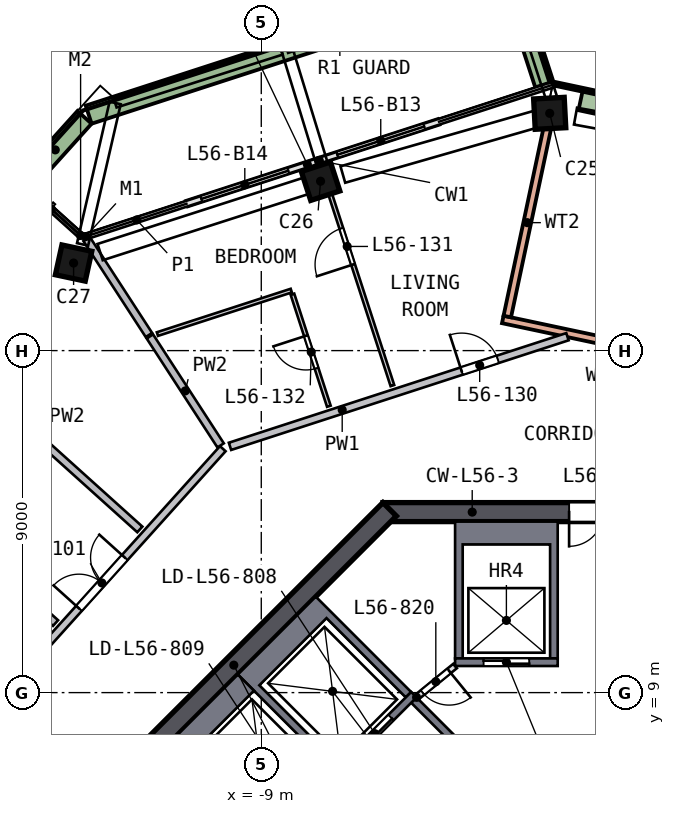
"""IFC4 building model, lengths in metres.
Left out: names, types, materials, properties, quantities, classifications, styles, units other than length and angle.
Written with IfcOpenShell. Run it as: python <this file> out.ifc"""

import sys

from ifc_helpers import new_model, si_unit, direction, frame, frame_2d, origin, origin_2d, place, context, subcontext, project, spatial, polyline, rectangle, outline, extrude, element, fill, save


model = new_model("IFC4")
c1 = context("Model", 3, precision=1e-05, world=origin(), true_north=direction((0.0, 1.0)))
c2 = subcontext(c1, "Body", "Model", "MODEL_VIEW")
j1 = project(units=[si_unit("LENGTHUNIT", "METRE"), si_unit("PLANEANGLEUNIT", "RADIAN")], contexts=[c1])
p1 = place(None, origin())
s1 = spatial("IfcSite", under=j1, at=p1, CompositionType="ELEMENT")
p2 = place(p1, origin())
s2 = spatial("IfcBuilding", under=s1, at=p2, CompositionType="ELEMENT")
p3 = place(p2, frame((0.0, 0.0, 230.5)))
s3 = spatial("IfcBuildingStorey", under=s2, at=p3, CompositionType="ELEMENT", Elevation=230.5)
p4 = place(p3, frame((-1.271, 24.253, 0.0), z_axis=(-0.115250266, -0.007070102, 0.993311326), x_axis=(0.991928647, 0.052401319, 0.115462816)))
e1 = element("IfcColumn", 1, at=p4, inside=s3, PredefinedType="COLUMN", context=c2, shape_type="SweptSolid", body=[
    extrude(rectangle(XDim=0.8, YDim=0.8, at=origin_2d()), origin(), (0.0, 0.0, 1.0), 3.211),
])
p5 = place(p3, frame((-7.311, 22.5, 0.0), z_axis=(-0.106771447, -0.03566653, 0.993643677), x_axis=(-0.945089515, -0.306813406, -0.112567057)))
e2 = element("IfcColumn", 2, at=p5, inside=s3, PredefinedType="COLUMN", context=c2, shape_type="SweptSolid", body=[
    extrude(rectangle(XDim=0.8, YDim=0.8, at=origin_2d()), origin(), (0.0, 0.0, 1.0), 3.21),
])
p6 = place(p3, frame((-13.822, 20.385, 0.0), z_axis=(-0.096378129, -0.06650699, 0.993120374), x_axis=(0.973507887, -0.214151828, 0.080133564)))
e3 = element("IfcColumn", 3, at=p6, inside=s3, PredefinedType="COLUMN", context=c2, shape_type="SweptSolid", body=[
    extrude(rectangle(XDim=0.8, YDim=0.8, at=origin_2d()), origin(), (0.0, 0.0, 1.0), 3.212),
])
p7 = place(p3, frame((5.799, 13.75, 0.0), z_axis=(0.0, 0.0, 1.0), x_axis=(-1.0, 0.0, 0.0)))
e4 = element("IfcWall", 4, at=p7, inside=s3, PredefinedType="SHEAR", context=c2, shape_type="SweptSolid", body=[
    extrude(rectangle(XDim=11.598, YDim=0.5, at=frame_2d((5.799, 0.0))), origin(), (0.0, 0.0, 1.0), 3.5),
])
p8 = place(p7, frame((4.899, 0.0, 0.0)))
e5 = element("IfcOpeningElement", 5, at=p8, cuts=e4, PredefinedType="OPENING", context=c2, shape_type="SweptSolid", body=[
    extrude(rectangle(XDim=1.8, YDim=2.1, at=frame_2d((0.9, 1.05))), frame((0.0, 0.26, 0.0), z_axis=(0.0, -1.0, 0.0), x_axis=(1.0, 0.0, 0.0)), (0.0, 0.0, 1.0), 0.52),
])
p9 = place(p3, frame((-5.622, 13.823, 0.0), z_axis=(0.0, 0.0, 1.0), x_axis=(-0.707106781, -0.707106781, 0.0)))
e6 = element("IfcWall", 6, at=p9, inside=s3, PredefinedType="SHEAR", context=c2, shape_type="SweptSolid", body=[
    extrude(rectangle(XDim=11.598, YDim=0.5, at=frame_2d((5.799, 0.0))), origin(), (0.0, 0.0, 1.0), 3.5),
])
p10 = place(p3, frame((-4.334, 24.02, 0.0), z_axis=(0.0, 0.0, 1.0), x_axis=(-0.95106016, -0.309005779, 0.0)))
e7 = element("IfcWall", 7, at=p10, inside=s3, PredefinedType="SOLIDWALL", context=c2, shape_type="SweptSolid", body=[
    extrude(rectangle(XDim=3.3, YDim=0.15, at=frame_2d((1.65, 0.0))), origin(), (0.0, 0.0, 1.0), 2.525),
])
p11 = place(p10, frame((0.4, 0.0, 0.0)))
e8 = element("IfcOpeningElement", 8, at=p11, cuts=e7, PredefinedType="OPENING", context=c2, shape_type="SweptSolid", body=[
    extrude(rectangle(XDim=2.4, YDim=2.4, at=frame_2d((1.2, 1.2))), frame((0.0, 0.085, 0.0), z_axis=(0.0, -1.0, 0.0), x_axis=(1.0, 0.0, 0.0)), (0.0, 0.0, 1.0), 0.17),
])
p12 = place(p3, frame((-7.473, 23.0, 0.0), z_axis=(0.0, 0.0, 1.0), x_axis=(-0.951056609, -0.30901671, 0.0)))
e9 = element("IfcWall", 9, at=p12, inside=s3, PredefinedType="SOLIDWALL", context=c2, shape_type="SweptSolid", body=[
    extrude(rectangle(XDim=3.661, YDim=0.15, at=frame_2d((1.831, 0.0))), origin(), (0.0, 0.0, 1.0), 2.525),
])
p13 = place(p12, frame((0.861, 0.0, 0.0)))
e10 = element("IfcOpeningElement", 10, at=p13, cuts=e9, PredefinedType="OPENING", context=c2, shape_type="SweptSolid", body=[
    extrude(rectangle(XDim=2.4, YDim=2.4, at=frame_2d((1.2, 1.2))), frame((0.0, 0.085, 0.0), z_axis=(0.0, -1.0, 0.0), x_axis=(1.0, 0.0, 0.0)), (0.0, 0.0, 1.0), 0.17),
])
p14 = place(p3, frame((-1.552, 25.003, 0.0), z_axis=(0.0, 0.0, 1.0), x_axis=(-0.309006691, 0.951059864, 0.0)))
e11 = element("IfcWall", 11, at=p14, inside=s3, PredefinedType="SOLIDWALL", context=c2, shape_type="SweptSolid", body=[
    extrude(rectangle(XDim=3.199, YDim=0.5, at=frame_2d((1.6, 0.0))), origin(), (0.0, 0.0, 1.0), 0.7),
])
p15 = place(p3, frame((-2.701, 27.731, 0.0), z_axis=(0.0, 0.0, 1.0), x_axis=(-0.951061138, -0.309002771, 0.0)))
e12 = element("IfcWall", 12, at=p15, inside=s3, PredefinedType="SOLIDWALL", context=c2, shape_type="SweptSolid", body=[
    extrude(rectangle(XDim=11.399, YDim=0.5, at=frame_2d((5.699, 0.0))), origin(), (0.0, 0.0, 1.0), 0.7),
])
p16 = place(p3, frame((-13.651, 24.138, 0.0), z_axis=(0.0, 0.0, 1.0), x_axis=(-0.669140422, -0.743135988, 0.0)))
e13 = element("IfcWall", 13, at=p16, inside=s3, PredefinedType="SOLIDWALL", context=c2, shape_type="SweptSolid", body=[
    extrude(rectangle(XDim=2.303, YDim=0.5, at=frame_2d((1.151, 0.0))), origin(), (0.0, 0.0, 1.0), 0.7),
])
p17 = place(p3, frame((-2.645, 18.82, 0.0), z_axis=(0.0, 0.0, 1.0), x_axis=(0.978146821, -0.207915357, 0.0)))
e14 = element("IfcWall", 14, at=p17, inside=s3, PredefinedType="SOLIDWALL", context=c2, shape_type="SweptSolid", body=[
    extrude(rectangle(XDim=13.0, YDim=0.2, at=frame_2d((6.5, 0.0))), origin(), (0.0, 0.0, 1.0), 3.19),
])
p18 = place(p17, frame((5.6, 0.0, 0.0)))
e15 = element("IfcOpeningElement", 15, at=p18, cuts=e14, PredefinedType="OPENING", context=c2, shape_type="SweptSolid", body=[
    extrude(rectangle(XDim=1.8, YDim=2.4, at=frame_2d((0.9, 1.2))), frame((0.0, 0.11, 0.0), z_axis=(0.0, -1.0, 0.0), x_axis=(1.0, 0.0, 0.0)), (0.0, 0.0, 1.0), 0.22),
])
p19 = place(p3, frame((-1.476, 23.838, 0.0), z_axis=(0.0, 0.0, 1.0), x_axis=(-0.207895168, -0.978151113, 0.0)))
e16 = element("IfcWall", 16, at=p19, inside=s3, PredefinedType="SOLIDWALL", context=c2, shape_type="SweptSolid", body=[
    extrude(rectangle(XDim=5.052, YDim=0.2, at=frame_2d((2.526, 0.0))), origin(), (0.0, 0.0, 1.0), 3.19),
])
p20 = place(p3, frame((11.313, 22.344, 0.0), z_axis=(0.0, 0.0, 1.0), x_axis=(-0.978146672, 0.207916061, 0.0)))
e17 = element("IfcWall", 17, at=p20, inside=s3, PredefinedType="SOLIDWALL", context=c2, shape_type="SweptSolid", body=[
    extrude(rectangle(XDim=12.84, YDim=0.1, at=frame_2d((6.42, 0.0))), origin(), (0.0, 0.0, 1.0), 0.7),
])
p21 = place(p3, frame((4.128, 23.565, 0.0), z_axis=(0.0, 0.0, 1.0), x_axis=(-0.978147683, 0.207911302, 0.0)))
e18 = element("IfcWall", 18, at=p21, inside=s3, PredefinedType="SOLIDWALL", context=c2, shape_type="SweptSolid", body=[
    extrude(rectangle(XDim=4.834, YDim=0.5, at=frame_2d((2.417, 0.0))), origin(), (0.0, 0.0, 1.0), 0.7),
])
p22 = place(p3, origin())
e19 = element("IfcWall", 19, at=p22, inside=s3, PredefinedType="SOLIDWALL", context=c2, shape_type="SweptSolid", body=[
    extrude(outline(polyline([(-3.9, 13.5), (-1.2, 13.5), (-1.2, 9.9), (-1.4, 9.9), (-1.4, 12.9), (-3.7, 12.9), (-3.7, 9.9), (-3.9, 9.9), (-3.9, 13.5)])), origin(), (0.0, 0.0, 1.0), 3.19),
])
p23 = place(p3, frame((-1.2, 9.8, 0.0), z_axis=(0.0, 0.0, 1.0), x_axis=(-1.0, 0.0, 0.0)))
e20 = element("IfcWall", 20, at=p23, inside=s3, PredefinedType="SOLIDWALL", context=c2, shape_type="SweptSolid", body=[
    extrude(rectangle(XDim=2.7, YDim=0.2, at=frame_2d((1.35, 0.0))), origin(), (0.0, 0.0, 1.0), 3.19),
])
p24 = place(p23, frame((0.75, 0.0, 0.0)))
e21 = element("IfcOpeningElement", 21, at=p24, cuts=e20, PredefinedType="OPENING", context=c2, shape_type="SweptSolid", body=[
    extrude(rectangle(XDim=1.2, YDim=2.1, at=frame_2d((0.6, 1.05))), frame((0.0, 0.11, 0.0), z_axis=(0.0, -1.0, 0.0), x_axis=(1.0, 0.0, 0.0)), (0.0, 0.0, 1.0), 0.22),
])
p25 = place(p3, origin())
e22 = element("IfcWall", 22, at=p25, inside=s3, PredefinedType="SOLIDWALL", context=c2, shape_type="SweptSolid", body=[
    extrude(outline(polyline([(-9.617, 9.475), (-7.566, 11.526), (-5.056, 9.016), (-5.197, 8.874), (-7.283, 10.96), (-9.051, 9.192), (-6.965, 7.106), (-7.106, 6.965), (-9.617, 9.475)])), origin(), (0.0, 0.0, 1.0), 3.19),
])
p26 = place(p3, frame((-4.985, 8.945, 0.0), z_axis=(0.0, 0.0, 1.0), x_axis=(-0.707106781, -0.707106781, 0.0)))
e23 = element("IfcWall", 23, at=p26, inside=s3, PredefinedType="SOLIDWALL", context=c2, shape_type="SweptSolid", body=[
    extrude(rectangle(XDim=2.9, YDim=0.2, at=frame_2d((1.45, 0.0))), origin(), (0.0, 0.0, 1.0), 3.19),
])
p27 = place(p26, frame((0.85, 0.0, 0.0)))
e24 = element("IfcOpeningElement", 24, at=p27, cuts=e23, PredefinedType="OPENING", context=c2, shape_type="SweptSolid", body=[
    extrude(rectangle(XDim=1.2, YDim=2.1, at=frame_2d((0.6, 1.05))), frame((0.0, 0.11, 0.0), z_axis=(0.0, -1.0, 0.0), x_axis=(1.0, 0.0, 0.0)), (0.0, 0.0, 1.0), 0.22),
])
p28 = place(p3, origin())
e25 = element("IfcWall", 25, at=p28, inside=s3, PredefinedType="SOLIDWALL", context=c2, shape_type="SweptSolid", body=[
    extrude(outline(polyline([(-11.526, 7.566), (-9.617, 9.475), (-9.192, 9.051), (-10.96, 7.283), (-8.874, 5.197), (-9.016, 5.056), (-11.526, 7.566)])), origin(), (0.0, 0.0, 1.0), 3.19),
])
p29 = place(p3, frame((-3.005, 6.823, 0.0), z_axis=(0.0, 0.0, 1.0), x_axis=(-0.707106781, 0.707106781, 0.0)))
e26 = element("IfcWall", 26, at=p29, inside=s3, PredefinedType="SOLIDWALL", context=c2, shape_type="SweptSolid", body=[
    extrude(rectangle(XDim=2.8, YDim=0.2, at=frame_2d((1.4, 0.0))), origin(), (0.0, 0.0, 1.0), 3.19),
])
p30 = place(p3, frame((-3.9, 9.7, 0.0), z_axis=(0.0, 0.0, 1.0), x_axis=(-0.775559878, -0.631274009, 0.0)))
e27 = element("IfcWall", 27, at=p30, inside=s3, PredefinedType="PARTITIONING", context=c2, shape_type="SweptSolid", body=[
    extrude(rectangle(XDim=1.308, YDim=0.15, at=frame_2d((0.654, 0.0))), origin(), (0.0, 0.0, 1.0), 3.19),
])
p31 = place(p30, frame((0.204, 0.0, 0.0)))
e28 = element("IfcOpeningElement", 28, at=p31, cuts=e27, PredefinedType="OPENING", context=c2, shape_type="SweptSolid", body=[
    extrude(rectangle(XDim=0.9, YDim=2.1, at=frame_2d((0.45, 1.05))), frame((0.0, 0.085, 0.0), z_axis=(0.0, -1.0, 0.0), x_axis=(1.0, 0.0, 0.0)), (0.0, 0.0, 1.0), 0.17),
])
p32 = place(p3, frame((-16.381, 8.346, 0.0), z_axis=(0.0, 0.0, 1.0), x_axis=(0.669131961, 0.743143605, 0.0)))
e29 = element("IfcWall", 29, at=p32, inside=s3, PredefinedType="SOLIDWALL", context=c2, shape_type="SweptSolid", body=[
    extrude(rectangle(XDim=9.517, YDim=0.2, at=frame_2d((4.758, 0.0))), origin(), (0.0, 0.0, 1.0), 3.19),
])
p33 = place(p32, frame((3.863, 0.0, 0.0)))
e30 = element("IfcOpeningElement", 30, at=p33, cuts=e29, PredefinedType="OPENING", context=c2, shape_type="SweptSolid", body=[
    extrude(rectangle(XDim=1.8, YDim=2.1, at=frame_2d((0.9, 1.05))), frame((0.0, 0.11, 0.0), z_axis=(0.0, -1.0, 0.0), x_axis=(1.0, 0.0, 0.0)), (0.0, 0.0, 1.0), 0.22),
])
p34 = place(p3, frame((-9.823, 15.481, 0.0), z_axis=(0.0, 0.0, 1.0), x_axis=(0.951064041, 0.308993835, 0.0)))
e31 = element("IfcWall", 31, at=p34, inside=s3, PredefinedType="SOLIDWALL", context=c2, shape_type="SweptSolid", body=[
    extrude(rectangle(XDim=9.337, YDim=0.2, at=frame_2d((4.668, 0.0))), origin(), (0.0, 0.0, 1.0), 3.19),
])
p35 = place(p34, frame((6.408, 0.0, 0.0)))
e32 = element("IfcOpeningElement", 32, at=p35, cuts=e31, PredefinedType="OPENING", context=c2, shape_type="SweptSolid", body=[
    extrude(rectangle(XDim=1.0, YDim=2.1, at=frame_2d((0.5, 1.05))), frame((0.0, 0.11, 0.0), z_axis=(0.0, -1.0, 0.0), x_axis=(1.0, 0.0, 0.0)), (0.0, 0.0, 1.0), 0.22),
])
p36 = place(p3, frame((-14.414, 10.831, 0.0), z_axis=(0.0, 0.0, 1.0), x_axis=(-0.743141846, 0.669133915, 0.0)))
e33 = element("IfcWall", 33, at=p36, inside=s3, PredefinedType="SOLIDWALL", context=c2, shape_type="SweptSolid", body=[
    extrude(rectangle(XDim=12.038, YDim=0.2, at=frame_2d((6.019, 0.0))), origin(), (0.0, 0.0, 1.0), 3.19),
])
p37 = place(p36, frame((3.65, 0.0, 0.0)))
e34 = element("IfcOpeningElement", 34, at=p37, cuts=e33, PredefinedType="OPENING", context=c2, shape_type="SweptSolid", body=[
    extrude(rectangle(XDim=1.0, YDim=2.1, at=frame_2d((0.5, 1.05))), frame((0.0, 0.11, 0.0), z_axis=(0.0, -1.0, 0.0), x_axis=(1.0, 0.0, 0.0)), (0.0, 0.0, 1.0), 0.22),
])
p38 = place(p3, frame((-21.141, 21.349, 0.0), z_axis=(0.0, 0.0, 1.0), x_axis=(0.743141846, -0.669133915, 0.0)))
e35 = element("IfcWall", 35, at=p38, inside=s3, PredefinedType="SOLIDWALL", context=c2, shape_type="SweptSolid", body=[
    extrude(rectangle(XDim=12.038, YDim=0.2, at=frame_2d((6.019, 0.0))), origin(), (0.0, 0.0, 1.0), 3.19),
])
p39 = place(p38, frame((3.95, 0.0, 0.0)))
e36 = element("IfcOpeningElement", 36, at=p39, cuts=e35, PredefinedType="OPENING", context=c2, shape_type="SweptSolid", body=[
    extrude(rectangle(XDim=1.0, YDim=2.1, at=frame_2d((0.5, 1.05))), frame((0.0, 0.11, 0.0), z_axis=(0.0, -1.0, 0.0), x_axis=(1.0, 0.0, 0.0)), (0.0, 0.0, 1.0), 0.22),
])
p40 = place(p3, frame((-13.596, 20.937, 0.0), z_axis=(0.0, 0.0, 1.0), x_axis=(0.544632104, -0.838675069, 0.0)))
e37 = element("IfcWall", 37, at=p40, inside=s3, PredefinedType="SOLIDWALL", context=c2, shape_type="SweptSolid", body=[
    extrude(rectangle(XDim=3.011, YDim=0.2, at=frame_2d((1.506, 0.0))), origin(), (0.0, 0.0, 1.0), 3.19),
])
p41 = place(p3, frame((-11.931, 18.373, 0.0), z_axis=(0.0, 0.0, 1.0), x_axis=(0.544639368, -0.838670352, 0.0)))
e38 = element("IfcWall", 38, at=p41, inside=s3, PredefinedType="SOLIDWALL", context=c2, shape_type="SweptSolid", body=[
    extrude(rectangle(XDim=3.418, YDim=0.2, at=frame_2d((1.709, 0.0))), origin(), (0.0, 0.0, 1.0), 3.19),
])
p42 = place(p3, frame((-8.211, 19.579, 0.0), z_axis=(0.0, 0.0, 1.0), x_axis=(-0.951055381, -0.30902049, 0.0)))
e39 = element("IfcWall", 39, at=p42, inside=s3, PredefinedType="PARTITIONING", context=c2, shape_type="SweptSolid", body=[
    extrude(rectangle(XDim=3.704, YDim=0.1, at=frame_2d((1.852, 0.0))), origin(), (0.0, 0.0, 1.0), 3.19),
])
p43 = place(p3, frame((-7.222, 16.536, 0.0), z_axis=(0.0, 0.0, 1.0), x_axis=(-0.309013065, 0.951057793, 0.0)))
e40 = element("IfcWall", 40, at=p43, inside=s3, PredefinedType="PARTITIONING", context=c2, shape_type="SweptSolid", body=[
    extrude(rectangle(XDim=3.1, YDim=0.1, at=frame_2d((1.55, 0.0))), origin(), (0.0, 0.0, 1.0), 3.19),
])
p44 = place(p43, frame((1.05, 0.0, 0.0)))
e41 = element("IfcOpeningElement", 41, at=p44, cuts=e40, PredefinedType="OPENING", context=c2, shape_type="SweptSolid", body=[
    extrude(rectangle(XDim=0.9, YDim=2.1, at=frame_2d((0.45, 1.05))), frame((0.0, 0.06, 0.0), z_axis=(0.0, -1.0, 0.0), x_axis=(1.0, 0.0, 0.0)), (0.0, 0.0, 1.0), 0.12),
])
p45 = place(p3, frame((-5.549, 17.079, 0.0), z_axis=(0.0, 0.0, 1.0), x_axis=(-0.309037601, 0.95104982, 0.0)))
e42 = element("IfcWall", 42, at=p45, inside=s3, PredefinedType="PARTITIONING", context=c2, shape_type="SweptSolid", body=[
    extrude(rectangle(XDim=6.15, YDim=0.1, at=frame_2d((3.075, 0.0))), origin(), (0.0, 0.0, 1.0), 3.19),
])
p46 = place(p45, frame((3.35, 0.0, 0.0)))
e43 = element("IfcOpeningElement", 43, at=p46, cuts=e42, PredefinedType="OPENING", context=c2, shape_type="SweptSolid", body=[
    extrude(rectangle(XDim=1.0, YDim=2.1, at=frame_2d((0.5, 1.05))), frame((0.0, 0.06, 0.0), z_axis=(0.0, -1.0, 0.0), x_axis=(1.0, 0.0, 0.0)), (0.0, 0.0, 1.0), 0.12),
])
p47 = place(p11, origin())
e44 = element("IfcDoor", 44, at=p47, inside=s3, OperationType="SLIDING_TO_RIGHT", PredefinedType="DOOR", context=c2, shape_type="SweptSolid", body=[
    extrude(rectangle(XDim=2.4, YDim=2.4, at=frame_2d((1.2, 1.2))), frame((0.0, 0.025, 0.0), z_axis=(0.0, -1.0, 0.0), x_axis=(1.0, 0.0, 0.0)), (0.0, 0.0, 1.0), 0.05),
])
fill(e8, e44)
p48 = place(p13, origin())
e45 = element("IfcDoor", 45, at=p48, inside=s3, OperationType="SLIDING_TO_LEFT", PredefinedType="DOOR", context=c2, shape_type="SweptSolid", body=[
    extrude(rectangle(XDim=2.4, YDim=2.4, at=frame_2d((1.2, 1.2))), frame((0.0, 0.025, 0.0), z_axis=(0.0, -1.0, 0.0), x_axis=(1.0, 0.0, 0.0)), (0.0, 0.0, 1.0), 0.05),
])
fill(e10, e45)
p49 = place(p24, origin())
e46 = element("IfcDoor", 46, at=p49, inside=s3, OperationType="DOUBLE_DOOR_SLIDING", PredefinedType="DOOR", context=c2, shape_type="SweptSolid", body=[
    extrude(rectangle(XDim=1.2, YDim=2.1, at=frame_2d((0.6, 1.05))), frame((0.0, 0.025, 0.0), z_axis=(0.0, -1.0, 0.0), x_axis=(1.0, 0.0, 0.0)), (0.0, 0.0, 1.0), 0.05),
])
fill(e21, e46)
p50 = place(p27, origin())
e47 = element("IfcDoor", 47, at=p50, inside=s3, OperationType="DOUBLE_DOOR_SLIDING", PredefinedType="DOOR", context=c2, shape_type="SweptSolid", body=[
    extrude(rectangle(XDim=1.2, YDim=2.1, at=frame_2d((0.6, 1.05))), frame((0.0, 0.025, 0.0), z_axis=(0.0, -1.0, 0.0), x_axis=(1.0, 0.0, 0.0)), (0.0, 0.0, 1.0), 0.05),
])
fill(e24, e47)
p51 = place(p8, origin())
e48 = element("IfcDoor", 48, at=p51, inside=s3, OperationType="DOUBLE_DOOR_SINGLE_SWING", PredefinedType="DOOR", context=c2, shape_type="SweptSolid", body=[
    extrude(rectangle(XDim=1.8, YDim=2.1, at=frame_2d((0.9, 1.05))), frame((0.0, 0.025, 0.0), z_axis=(0.0, -1.0, 0.0), x_axis=(1.0, 0.0, 0.0)), (0.0, 0.0, 1.0), 0.05),
])
fill(e5, e48)
p52 = place(p31, origin())
e49 = element("IfcDoor", 49, at=p52, inside=s3, OperationType="SINGLE_SWING_LEFT", PredefinedType="DOOR", context=c2, shape_type="SweptSolid", body=[
    extrude(rectangle(XDim=0.9, YDim=2.1, at=frame_2d((0.45, 1.05))), frame((0.0, 0.025, 0.0), z_axis=(0.0, -1.0, 0.0), x_axis=(1.0, 0.0, 0.0)), (0.0, 0.0, 1.0), 0.05),
])
fill(e28, e49)
p53 = place(p33, origin())
e50 = element("IfcDoor", 50, at=p53, inside=s3, OperationType="DOUBLE_DOOR_SINGLE_SWING", PredefinedType="DOOR", context=c2, shape_type="SweptSolid", body=[
    extrude(rectangle(XDim=1.8, YDim=2.1, at=frame_2d((0.9, 1.05))), frame((0.0, 0.025, 0.0), z_axis=(0.0, -1.0, 0.0), x_axis=(1.0, 0.0, 0.0)), (0.0, 0.0, 1.0), 0.05),
])
fill(e30, e50)
p54 = place(p35, origin())
e51 = element("IfcDoor", 51, at=p54, inside=s3, OperationType="SINGLE_SWING_LEFT", PredefinedType="DOOR", context=c2, shape_type="SweptSolid", body=[
    extrude(rectangle(XDim=1.0, YDim=2.1, at=frame_2d((0.5, 1.05))), frame((0.0, 0.025, 0.0), z_axis=(0.0, -1.0, 0.0), x_axis=(1.0, 0.0, 0.0)), (0.0, 0.0, 1.0), 0.05),
])
fill(e32, e51)
p55 = place(p46, origin())
e52 = element("IfcDoor", 52, at=p55, inside=s3, OperationType="SINGLE_SWING_LEFT", PredefinedType="DOOR", context=c2, shape_type="SweptSolid", body=[
    extrude(rectangle(XDim=1.0, YDim=2.1, at=frame_2d((0.5, 1.05))), frame((0.0, 0.025, 0.0), z_axis=(0.0, -1.0, 0.0), x_axis=(1.0, 0.0, 0.0)), (0.0, 0.0, 1.0), 0.05),
])
fill(e43, e52)
p56 = place(p44, origin())
e53 = element("IfcDoor", 53, at=p56, inside=s3, OperationType="SINGLE_SWING_RIGHT", PredefinedType="DOOR", context=c2, shape_type="SweptSolid", body=[
    extrude(rectangle(XDim=0.9, YDim=2.1, at=frame_2d((0.45, 1.05))), frame((0.0, 0.025, 0.0), z_axis=(0.0, -1.0, 0.0), x_axis=(1.0, 0.0, 0.0)), (0.0, 0.0, 1.0), 0.05),
])
fill(e41, e53)
save(model, sys.argv[1])
